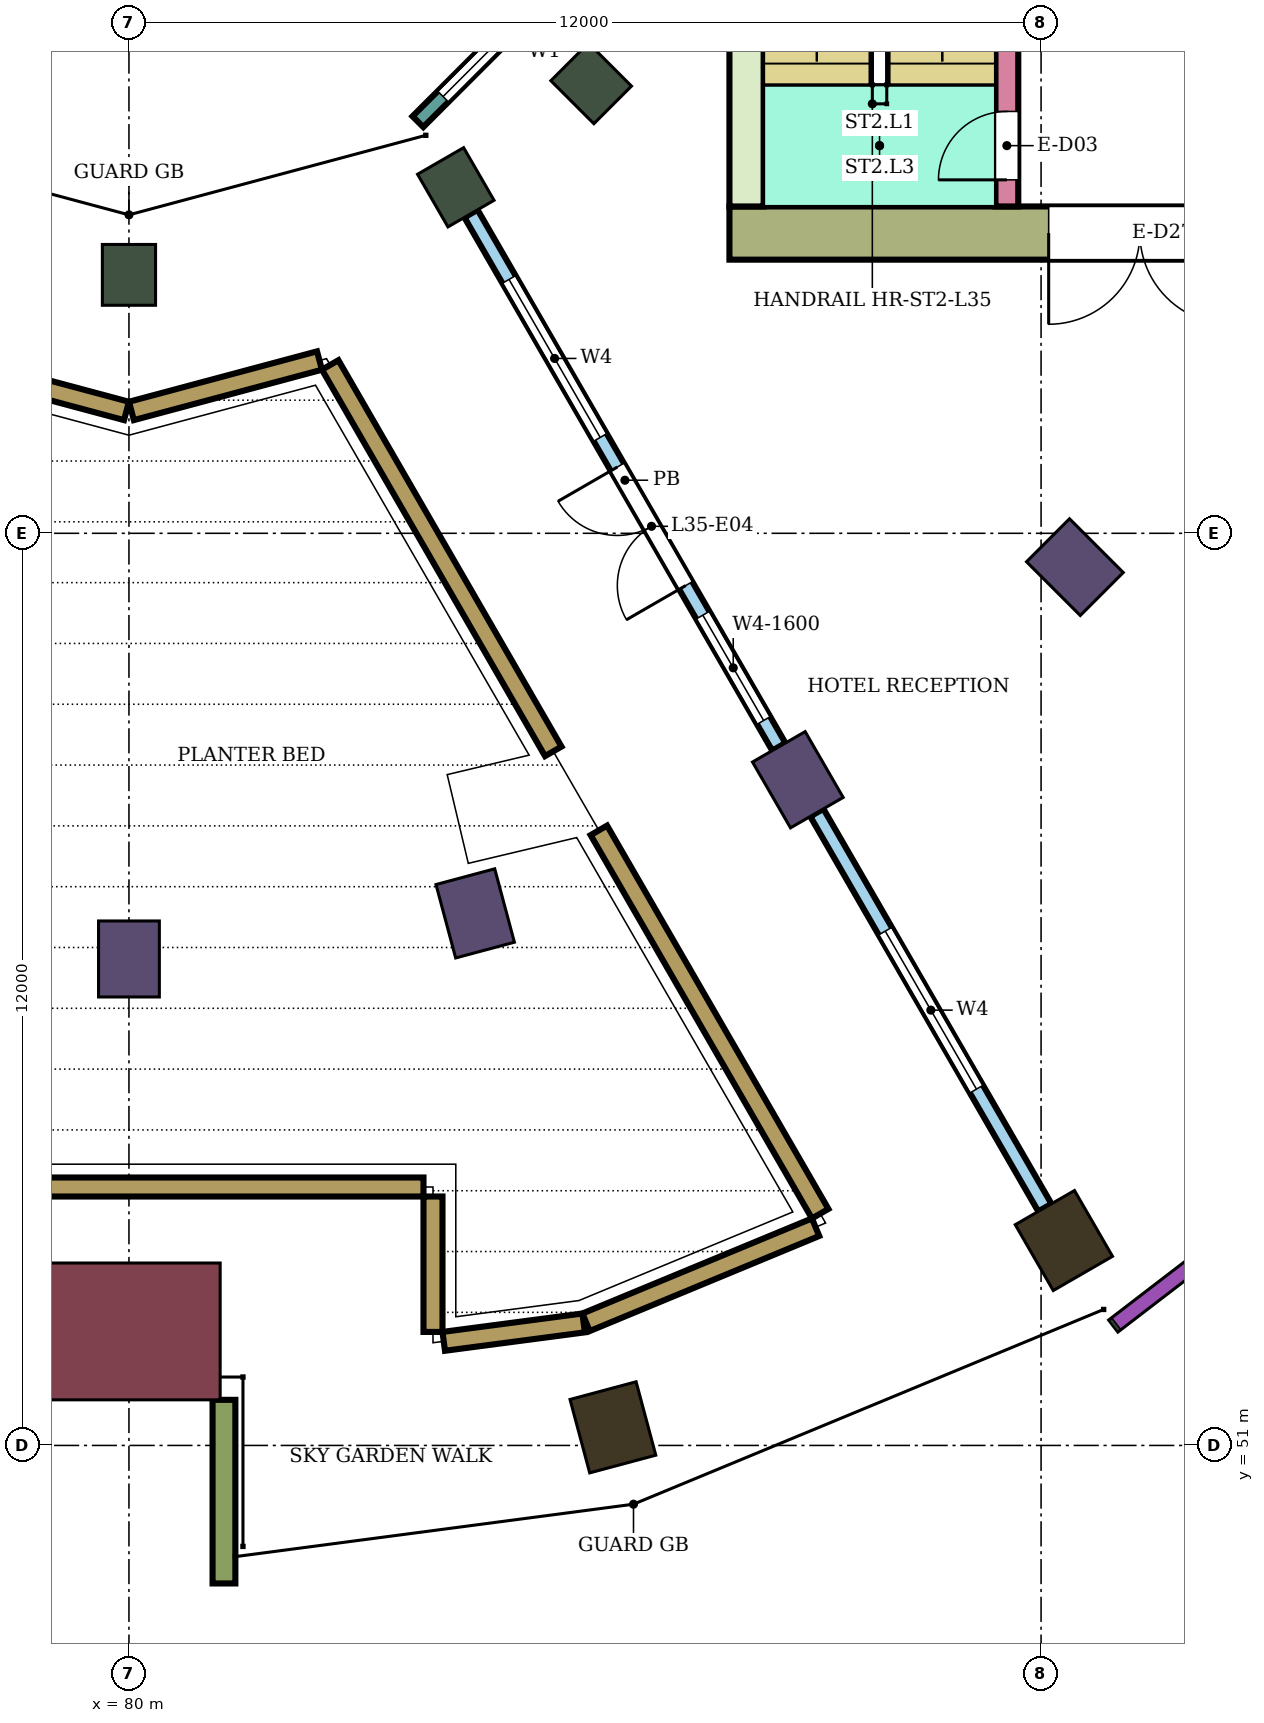
"""IFC4 building model, lengths in metres.
Left out: names, types, materials, properties, quantities, classifications, styles, units other than length and angle.
Written with IfcOpenShell. Run it as: python <this file> out.ifc"""

import sys

from ifc_helpers import new_model, si_unit, direction, frame, frame_2d, origin, origin_2d, place, context, subcontext, project, spatial, rectangle, extrude, element, fill, save


model = new_model("IFC4")
c1 = context("Model", 3, precision=1e-05, world=origin(), true_north=direction((0.0, 1.0)))
c2 = subcontext(c1, "Body", "Model", "MODEL_VIEW")
j1 = project(units=[si_unit("LENGTHUNIT", "METRE"), si_unit("PLANEANGLEUNIT", "RADIAN")], contexts=[c1])
p1 = place(None, origin())
s1 = spatial("IfcSite", under=j1, at=p1, CompositionType="ELEMENT")
p2 = place(p1, origin())
s2 = spatial("IfcBuilding", under=s1, at=p2, CompositionType="ELEMENT")
p3 = place(p2, frame((0.0, 0.0, 149.7)))
s3 = spatial("IfcBuildingStorey", under=s2, at=p3, CompositionType="ELEMENT", Elevation=149.7)
for number, where, z_axis, x_axis in (
    (1, (86.367, 51.238, 0.0), (0.0, 0.0, 1.0), (0.259, -0.966, 0.0)),
    (2, (92.3, 53.696, 0.0), (0.0, 0.0, 1.0), (0.5, -0.866, 0.0)),
):
    element("IfcColumn", number, at=place(p3, frame(where, z_axis=z_axis, x_axis=x_axis)), inside=s3, PredefinedType="COLUMN", context=c2, shape_type="SweptSolid", body=[
        extrude(rectangle(XDim=1.0, YDim=0.9, at=origin_2d()), origin(), (0.0, 0.0, 1.0), 8.0),
    ])
for number, where, z_axis, x_axis in (
    (3, (80.0, 57.4, 0.0), (0.0, 0.0, 1.0), (0.0, -1.0, 0.0)),
    (4, (84.555, 58.0, 0.0), (0.0, 0.0, 1.0), (0.259, -0.966, 0.0)),
    (5, (88.8, 59.758, 0.0), (0.0, 0.0, 1.0), (0.5, -0.866, 0.0)),
    (6, (92.445, 62.555, 0.0), (0.0, 0.0, 1.0), (0.707, -0.707, 0.0)),
):
    element("IfcColumn", number, at=place(p3, frame(where, z_axis=z_axis, x_axis=x_axis)), inside=s3, PredefinedType="COLUMN", context=c2, shape_type="SweptSolid", body=[
        extrude(rectangle(XDim=1.0, YDim=0.8, at=origin_2d()), origin(), (0.0, 0.0, 1.0), 8.0),
    ])
for number, where, z_axis, x_axis in (
    (7, (80.0, 66.4, 0.0), (0.0, 0.0, 1.0), (0.0, -1.0, 0.0)),
    (8, (84.3, 67.552, 0.0), (0.0, 0.0, 1.0), (0.5, -0.866, 0.0)),
    (9, (86.081, 68.919, 0.0), (0.0, 0.0, 1.0), (0.707, -0.707, 0.0)),
):
    element("IfcColumn", number, at=place(p3, frame(where, z_axis=z_axis, x_axis=x_axis)), inside=s3, PredefinedType="COLUMN", context=c2, shape_type="SweptSolid", body=[
        extrude(rectangle(XDim=0.8, YDim=0.7, at=origin_2d()), origin(), (0.0, 0.0, 1.0), 8.0),
    ])
p4 = place(p3, frame((80.0, 52.5, 0.0), z_axis=(0.0, 0.0, 1.0), x_axis=(0.0, -1.0, 0.0)))
e10 = element("IfcColumn", 10, at=p4, inside=s3, PredefinedType="COLUMN", context=c2, shape_type="SweptSolid", body=[
    extrude(rectangle(XDim=1.8, YDim=2.4, at=origin_2d()), origin(), (0.0, 0.0, 1.0), 8.0),
])
p5 = place(p3, frame((87.9, 66.95, 0.0), z_axis=(0.0, 0.0, 1.0), x_axis=(1.0, 0.0, 0.0)))
e11 = element("IfcWall", 11, at=p5, inside=s3, PredefinedType="SHEAR", context=c2, shape_type="SweptSolid", body=[
    extrude(rectangle(XDim=14.8, YDim=0.7, at=frame_2d((7.4, 0.0))), origin(), (0.0, 0.0, 1.0), 7.68),
])
p6 = place(p5, frame((4.2, 0.0, 0.0)))
e12 = element("IfcOpeningElement", 12, at=p6, cuts=e11, PredefinedType="OPENING", context=c2, shape_type="SweptSolid", body=[
    extrude(rectangle(XDim=2.4, YDim=2.4, at=frame_2d((1.2, 1.2))), frame((0.0, 0.36, 0.0), z_axis=(0.0, -1.0, 0.0), x_axis=(1.0, 0.0, 0.0)), (0.0, 0.0, 1.0), 0.72),
])
p7 = place(p3, frame((88.125, 67.3, 0.0), z_axis=(0.0, 0.0, 1.0), x_axis=(0.0, 1.0, 0.0)))
e13 = element("IfcWall", 13, at=p7, inside=s3, PredefinedType="SHEAR", context=c2, shape_type="SweptSolid", body=[
    extrude(rectangle(XDim=7.7, YDim=0.45, at=frame_2d((3.85, 0.0))), origin(), (0.0, 0.0, 1.0), 7.68),
])
p8 = place(p3, frame((91.55, 67.3, 0.0), z_axis=(0.0, 0.0, 1.0), x_axis=(0.0, 1.0, 0.0)))
e14 = element("IfcWall", 14, at=p8, inside=s3, PredefinedType="SHEAR", context=c2, shape_type="SweptSolid", body=[
    extrude(rectangle(XDim=7.7, YDim=0.3, at=frame_2d((3.85, 0.0))), origin(), (0.0, 0.0, 1.0), 7.68),
])
p9 = place(p8, frame((0.35, 0.0, 0.0)))
e15 = element("IfcOpeningElement", 15, at=p9, cuts=e14, PredefinedType="OPENING", context=c2, shape_type="SweptSolid", body=[
    extrude(rectangle(XDim=0.9, YDim=2.1, at=frame_2d((0.45, 1.05))), frame((0.0, 0.16, 0.0), z_axis=(0.0, -1.0, 0.0), x_axis=(1.0, 0.0, 0.0)), (0.0, 0.0, 1.0), 0.32),
])
p10 = place(p3, frame((81.25, 51.6, 0.0), z_axis=(0.0, 0.0, 1.0), x_axis=(0.0, -1.0, 0.0)))
e16 = element("IfcWall", 16, at=p10, inside=s3, PredefinedType="NOTDEFINED", context=c2, shape_type="SweptSolid", body=[
    extrude(rectangle(XDim=2.416, YDim=0.3, at=frame_2d((1.208, 0.0))), origin(), (0.0, 0.0, 1.0), 8.0),
])
p11 = place(p3, frame((83.802, 68.415, 0.0), z_axis=(0.0, 0.0, 1.0), x_axis=(0.707106781187, 0.707106781187, 0.0)))
e17 = element("IfcWall", 17, at=p11, inside=s3, PredefinedType="NOTDEFINED", context=c2, shape_type="SweptSolid", body=[
    extrude(rectangle(XDim=3.936, YDim=0.2, at=frame_2d((1.968, 0.0))), origin(), (0.0, 0.0, 1.0), 8.0),
])
p12 = place(p11, frame((0.468, 0.0, 0.9)))
e18 = element("IfcOpeningElement", 18, at=p12, cuts=e17, PredefinedType="OPENING", context=c2, shape_type="SweptSolid", body=[
    extrude(rectangle(XDim=3.0, YDim=2.3, at=frame_2d((1.5, 1.15))), frame((0.0, 0.11, 0.0), z_axis=(0.0, -1.0, 0.0), x_axis=(1.0, 0.0, 0.0)), (0.0, 0.0, 1.0), 0.22),
])
p13 = place(p3, frame((76.125, 54.4, 0.0), z_axis=(0.0, 0.0, 1.0), x_axis=(1.0, 0.0, 0.0)))
e19 = element("IfcWall", 19, at=p13, inside=s3, PredefinedType="USERDEFINED", context=c2, shape_type="SweptSolid", body=[
    extrude(rectangle(XDim=7.75, YDim=0.25, at=frame_2d((3.875, 0.0))), origin(), (0.0, 0.0, 1.0), 0.6),
])
p14 = place(p3, frame((84.0, 54.275, 0.0), z_axis=(0.0, 0.0, 1.0), x_axis=(0.0, -1.0, 0.0)))
e20 = element("IfcWall", 20, at=p14, inside=s3, PredefinedType="USERDEFINED", context=c2, shape_type="SweptSolid", body=[
    extrude(rectangle(XDim=1.781, YDim=0.25, at=frame_2d((0.891, 0.0))), origin(), (0.0, 0.0, 1.0), 0.6),
])
p15 = place(p3, frame((84.141, 52.369, 0.0), z_axis=(0.0, 0.0, 1.0), x_axis=(0.991436829887, 0.130587182926, 0.0)))
e21 = element("IfcWall", 21, at=p15, inside=s3, PredefinedType="USERDEFINED", context=c2, shape_type="SweptSolid", body=[
    extrude(rectangle(XDim=1.856, YDim=0.25, at=frame_2d((0.928, 0.0))), origin(), (0.0, 0.0, 1.0), 0.6),
])
p16 = place(p3, frame((86.014, 52.62, 0.0), z_axis=(0.0, 0.0, 1.0), x_axis=(0.923863886655, 0.382721202621, 0.0)))
e22 = element("IfcWall", 22, at=p16, inside=s3, PredefinedType="USERDEFINED", context=c2, shape_type="SweptSolid", body=[
    extrude(rectangle(XDim=3.269, YDim=0.25, at=frame_2d((1.634, 0.0))), origin(), (0.0, 0.0, 1.0), 0.6),
])
p17 = place(p3, frame((89.094, 54.049, 0.0), z_axis=(0.0, 0.0, 1.0), x_axis=(-0.50000795037, 0.866020813587, 0.0)))
e23 = element("IfcWall", 23, at=p17, inside=s3, PredefinedType="USERDEFINED", context=c2, shape_type="SweptSolid", body=[
    extrude(rectangle(XDim=5.823, YDim=0.25, at=frame_2d((2.912, 0.0))), origin(), (0.0, 0.0, 1.0), 0.6),
])
p18 = place(p3, frame((85.582, 60.131, 0.0), z_axis=(0.0, 0.0, 1.0), x_axis=(-0.499999689456, 0.866025583077, 0.0)))
e24 = element("IfcWall", 24, at=p18, inside=s3, PredefinedType="USERDEFINED", context=c2, shape_type="SweptSolid", body=[
    extrude(rectangle(XDim=5.87, YDim=0.25, at=frame_2d((2.935, 0.0))), origin(), (0.0, 0.0, 1.0), 0.6),
])
for number, where, z_axis, x_axis in (
    (25, (82.507, 65.273, 0.0), (0.0, 0.0, 1.0), (-0.966, -0.259, 0.0)),
    (26, (79.968, 64.61, 0.0), (0.0, 0.0, 1.0), (-0.966, 0.259, 0.0)),
):
    element("IfcWall", number, at=place(p3, frame(where, z_axis=z_axis, x_axis=x_axis)), inside=s3, PredefinedType="USERDEFINED", context=c2, shape_type="SweptSolid", body=[
        extrude(rectangle(XDim=2.562, YDim=0.25, at=frame_2d((1.281, 0.0))), origin(), (0.0, 0.0, 1.0), 0.6),
    ])
p19 = place(p3, frame((84.5, 67.206, 0.0), z_axis=(0.0, 0.0, 1.0), x_axis=(0.499999880539, -0.866025472755, 0.0)))
e27 = element("IfcWall", 27, at=p19, inside=s3, PredefinedType="NOTDEFINED", context=c2, shape_type="SweptSolid", body=[
    extrude(rectangle(XDim=8.1, YDim=0.2, at=frame_2d((4.05, 0.0))), origin(), (0.0, 0.0, 1.0), 8.0),
])
p20 = place(p19, frame((1.0, 0.0, 0.3)))
e28 = element("IfcOpeningElement", 28, at=p20, cuts=e27, PredefinedType="OPENING", context=c2, shape_type="SweptSolid", body=[
    extrude(rectangle(XDim=2.4, YDim=3.6, at=frame_2d((1.2, 1.8))), frame((0.0, 0.11, 0.0), z_axis=(0.0, -1.0, 0.0), x_axis=(1.0, 0.0, 0.0)), (0.0, 0.0, 1.0), 0.22),
])
p21 = place(p19, frame((3.85, 0.0, 0.0)))
e29 = element("IfcOpeningElement", 29, at=p21, cuts=e27, PredefinedType="OPENING", context=c2, shape_type="SweptSolid", body=[
    extrude(rectangle(XDim=1.8, YDim=2.4, at=frame_2d((0.9, 1.2))), frame((0.0, 0.11, 0.0), z_axis=(0.0, -1.0, 0.0), x_axis=(1.0, 0.0, 0.0)), (0.0, 0.0, 1.0), 0.22),
])
p22 = place(p19, frame((6.1, 0.0, 0.3)))
e30 = element("IfcOpeningElement", 30, at=p22, cuts=e27, PredefinedType="OPENING", context=c2, shape_type="SweptSolid", body=[
    extrude(rectangle(XDim=1.6, YDim=3.6, at=frame_2d((0.8, 1.8))), frame((0.0, 0.11, 0.0), z_axis=(0.0, -1.0, 0.0), x_axis=(1.0, 0.0, 0.0)), (0.0, 0.0, 1.0), 0.22),
])
p23 = place(p3, frame((89.05, 59.325, 0.0), z_axis=(0.0, 0.0, 1.0), x_axis=(0.500007758305, -0.866020924479, 0.0)))
e31 = element("IfcWall", 31, at=p23, inside=s3, PredefinedType="NOTDEFINED", context=c2, shape_type="SweptSolid", body=[
    extrude(rectangle(XDim=6.0, YDim=0.2, at=frame_2d((3.0, 0.0))), origin(), (0.0, 0.0, 1.0), 8.0),
])
p24 = place(p23, frame((1.8, 0.0, 0.3)))
e32 = element("IfcOpeningElement", 32, at=p24, cuts=e31, PredefinedType="OPENING", context=c2, shape_type="SweptSolid", body=[
    extrude(rectangle(XDim=2.4, YDim=3.6, at=frame_2d((1.2, 1.8))), frame((0.0, 0.11, 0.0), z_axis=(0.0, -1.0, 0.0), x_axis=(1.0, 0.0, 0.0)), (0.0, 0.0, 1.0), 0.22),
])
p25 = place(p12, origin())
e33 = element("IfcWindow", 33, at=p25, inside=s3, PartitioningType="SINGLE_PANEL", PredefinedType="WINDOW", context=c2, shape_type="SweptSolid", body=[
    extrude(rectangle(XDim=3.0, YDim=2.3, at=frame_2d((1.5, 1.15))), frame((0.0, 0.03, 0.0), z_axis=(0.0, -1.0, 0.0), x_axis=(1.0, 0.0, 0.0)), (0.0, 0.0, 1.0), 0.06),
])
fill(e18, e33)
p26 = place(p20, origin())
e34 = element("IfcWindow", 34, at=p26, inside=s3, PartitioningType="SINGLE_PANEL", PredefinedType="WINDOW", context=c2, shape_type="SweptSolid", body=[
    extrude(rectangle(XDim=2.4, YDim=3.6, at=frame_2d((1.2, 1.8))), frame((0.0, 0.03, 0.0), z_axis=(0.0, -1.0, 0.0), x_axis=(1.0, 0.0, 0.0)), (0.0, 0.0, 1.0), 0.06),
])
fill(e28, e34)
p27 = place(p21, frame((1.8, 0.0, 0.0), z_axis=(0.0, 0.0, 1.0), x_axis=(-1.0, 0.0, 0.0)))
e35 = element("IfcDoor", 35, at=p27, inside=s3, OperationType="DOUBLE_DOOR_SINGLE_SWING", PredefinedType="DOOR", context=c2, shape_type="SweptSolid", body=[
    extrude(rectangle(XDim=1.8, YDim=2.4, at=frame_2d((0.9, 1.2))), frame((0.0, 0.025, 0.0), z_axis=(0.0, -1.0, 0.0), x_axis=(1.0, 0.0, 0.0)), (0.0, 0.0, 1.0), 0.05),
])
fill(e29, e35)
p28 = place(p22, origin())
e36 = element("IfcWindow", 36, at=p28, inside=s3, PartitioningType="SINGLE_PANEL", PredefinedType="WINDOW", context=c2, shape_type="SweptSolid", body=[
    extrude(rectangle(XDim=1.6, YDim=3.6, at=frame_2d((0.8, 1.8))), frame((0.0, 0.03, 0.0), z_axis=(0.0, -1.0, 0.0), x_axis=(1.0, 0.0, 0.0)), (0.0, 0.0, 1.0), 0.06),
])
fill(e30, e36)
p29 = place(p24, origin())
e37 = element("IfcWindow", 37, at=p29, inside=s3, PartitioningType="SINGLE_PANEL", PredefinedType="WINDOW", context=c2, shape_type="SweptSolid", body=[
    extrude(rectangle(XDim=2.4, YDim=3.6, at=frame_2d((1.2, 1.8))), frame((0.0, 0.03, 0.0), z_axis=(0.0, -1.0, 0.0), x_axis=(1.0, 0.0, 0.0)), (0.0, 0.0, 1.0), 0.06),
])
fill(e32, e37)
p30 = place(p9, origin())
e38 = element("IfcDoor", 38, at=p30, inside=s3, OperationType="SINGLE_SWING_LEFT", PredefinedType="DOOR", context=c2, shape_type="SweptSolid", body=[
    extrude(rectangle(XDim=0.9, YDim=2.1, at=frame_2d((0.45, 1.05))), frame((0.0, 0.025, 0.0), z_axis=(0.0, -1.0, 0.0), x_axis=(1.0, 0.0, 0.0)), (0.0, 0.0, 1.0), 0.05),
])
fill(e15, e38)
p31 = place(p6, frame((2.4, 0.0, 0.0), z_axis=(0.0, 0.0, 1.0), x_axis=(-1.0, 0.0, 0.0)))
e39 = element("IfcDoor", 39, at=p31, inside=s3, OperationType="DOUBLE_DOOR_SINGLE_SWING", PredefinedType="DOOR", context=c2, shape_type="SweptSolid", body=[
    extrude(rectangle(XDim=2.4, YDim=2.4, at=frame_2d((1.2, 1.2))), frame((0.0, 0.025, 0.0), z_axis=(0.0, -1.0, 0.0), x_axis=(1.0, 0.0, 0.0)), (0.0, 0.0, 1.0), 0.05),
])
fill(e12, e39)
save(model, sys.argv[1])
